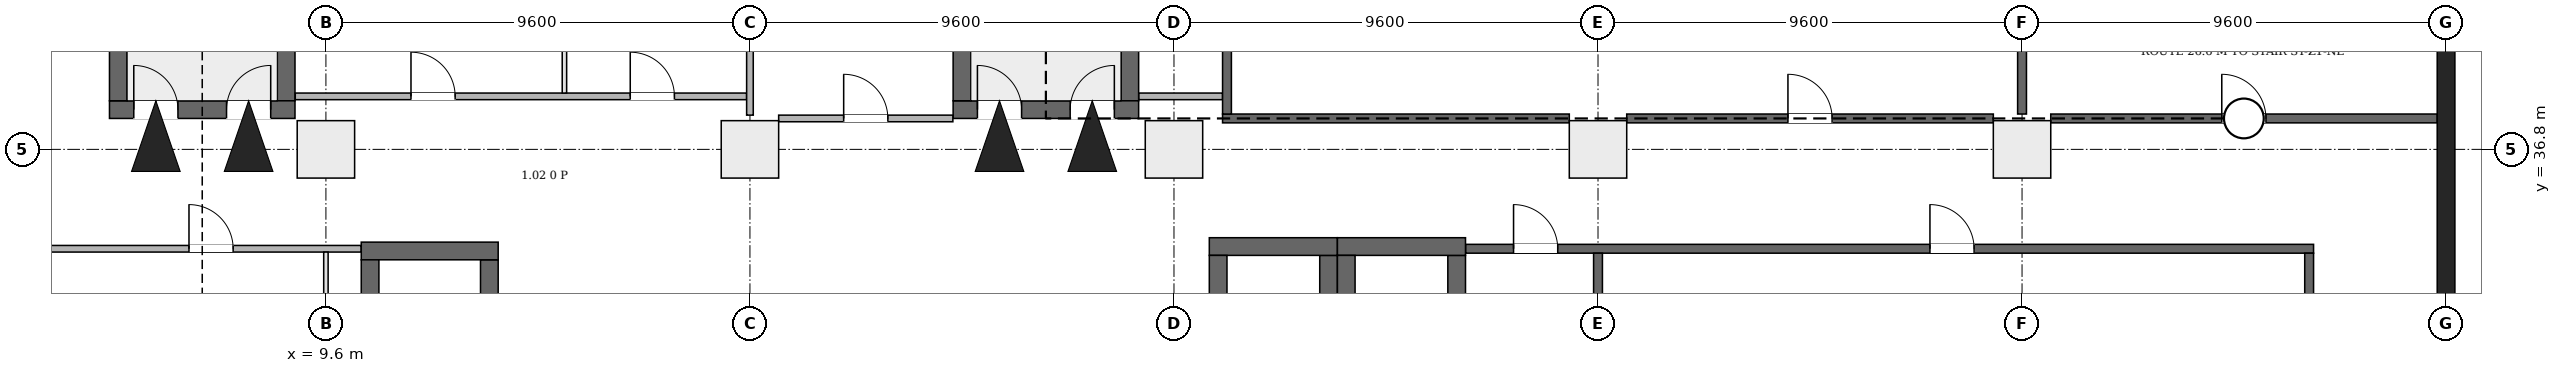
"""IFC4 building model, lengths in metres.
Left out: names, types, materials, properties, quantities, classifications, styles, units other than length and angle.
Written with IfcOpenShell. Run it as: python <this file> out.ifc"""

import sys

from ifc_helpers import new_model, si_unit, direction, frame, frame_2d, origin, origin_2d, place, context, subcontext, project, spatial, rectangle, extrude, element, fill, save


model = new_model("IFC4")
c1 = context("Model", 3, precision=1e-05, world=origin(), true_north=direction((0.0, 1.0)))
c2 = subcontext(c1, "Body", "Model", "MODEL_VIEW")
j1 = project(units=[si_unit("LENGTHUNIT", "METRE"), si_unit("PLANEANGLEUNIT", "RADIAN")], contexts=[c1])
p1 = place(None, origin())
s1 = spatial("IfcSite", under=j1, at=p1, CompositionType="ELEMENT")
p2 = place(p1, origin())
s2 = spatial("IfcBuilding", under=s1, at=p2, CompositionType="ELEMENT")
p3 = place(p2, frame((0.0, 0.0, 6.5)))
s3 = spatial("IfcBuildingStorey", under=s2, at=p3, CompositionType="ELEMENT", Elevation=6.5)
p4 = place(p3, frame((57.6, -0.2, 0.0), z_axis=(0.0, 0.0, 1.0), x_axis=(0.0, 1.0, 0.0)))
e1 = element("IfcWall", 1, at=p4, inside=s3, PredefinedType="SHEAR", context=c2, shape_type="SweptSolid", body=[
    extrude(rectangle(XDim=46.88, YDim=0.4, at=frame_2d((23.44, 0.0))), origin(), (0.0, 0.0, 1.0), 7.7),
])
p5 = place(p3, frame((4.7, 37.7, 0.0), z_axis=(0.0, 0.0, 1.0), x_axis=(1.0, 0.0, 0.0)))
e2 = element("IfcWall", 2, at=p5, inside=s3, PredefinedType="SHEAR", context=c2, shape_type="SweptSolid", body=[
    extrude(rectangle(XDim=4.2, YDim=0.4, at=frame_2d((2.1, 0.0))), origin(), (0.0, 0.0, 1.0), 7.7),
])
p6 = place(p5, frame((0.55, 0.0, 0.0)))
e3 = element("IfcOpeningElement", 3, at=p6, cuts=e2, PredefinedType="OPENING", context=c2, shape_type="SweptSolid", body=[
    extrude(rectangle(XDim=1.0, YDim=2.1, at=frame_2d((0.5, 1.05))), frame((0.0, 0.21, 0.0), z_axis=(0.0, -1.0, 0.0), x_axis=(1.0, 0.0, 0.0)), (0.0, 0.0, 1.0), 0.42),
])
p7 = place(p5, frame((2.65, 0.0, 0.0)))
e4 = element("IfcOpeningElement", 4, at=p7, cuts=e2, PredefinedType="OPENING", context=c2, shape_type="SweptSolid", body=[
    extrude(rectangle(XDim=1.0, YDim=2.1, at=frame_2d((0.5, 1.05))), frame((0.0, 0.21, 0.0), z_axis=(0.0, -1.0, 0.0), x_axis=(1.0, 0.0, 0.0)), (0.0, 0.0, 1.0), 0.42),
])
for number, where, z_axis, x_axis in (
    (5, (4.9, 37.9, 0.0), (0.0, 0.0, 1.0), (0.0, 1.0, 0.0)),
    (6, (8.7, 37.9, 0.0), (0.0, 0.0, 1.0), (0.0, 1.0, 0.0)),
):
    element("IfcWall", number, at=place(p3, frame(where, z_axis=z_axis, x_axis=x_axis)), inside=s3, PredefinedType="SHEAR", context=c2, shape_type="SweptSolid", body=[
        extrude(rectangle(XDim=6.6, YDim=0.4, at=frame_2d((3.3, 0.0))), origin(), (0.0, 0.0, 1.0), 7.7),
    ])
p8 = place(p3, frame((23.8, 37.7, 0.0), z_axis=(0.0, 0.0, 1.0), x_axis=(1.0, 0.0, 0.0)))
e7 = element("IfcWall", 7, at=p8, inside=s3, PredefinedType="SHEAR", context=c2, shape_type="SweptSolid", body=[
    extrude(rectangle(XDim=4.2, YDim=0.4, at=frame_2d((2.1, 0.0))), origin(), (0.0, 0.0, 1.0), 7.7),
])
p9 = place(p8, frame((0.55, 0.0, 0.0)))
e8 = element("IfcOpeningElement", 8, at=p9, cuts=e7, PredefinedType="OPENING", context=c2, shape_type="SweptSolid", body=[
    extrude(rectangle(XDim=1.0, YDim=2.1, at=frame_2d((0.5, 1.05))), frame((0.0, 0.21, 0.0), z_axis=(0.0, -1.0, 0.0), x_axis=(1.0, 0.0, 0.0)), (0.0, 0.0, 1.0), 0.42),
])
p10 = place(p8, frame((2.65, 0.0, 0.0)))
e9 = element("IfcOpeningElement", 9, at=p10, cuts=e7, PredefinedType="OPENING", context=c2, shape_type="SweptSolid", body=[
    extrude(rectangle(XDim=1.0, YDim=2.1, at=frame_2d((0.5, 1.05))), frame((0.0, 0.21, 0.0), z_axis=(0.0, -1.0, 0.0), x_axis=(1.0, 0.0, 0.0)), (0.0, 0.0, 1.0), 0.42),
])
for number, where, z_axis, x_axis in (
    (10, (24.0, 37.9, 0.0), (0.0, 0.0, 1.0), (0.0, 1.0, 0.0)),
    (11, (27.8, 37.9, 0.0), (0.0, 0.0, 1.0), (0.0, 1.0, 0.0)),
):
    element("IfcWall", number, at=place(p3, frame(where, z_axis=z_axis, x_axis=x_axis)), inside=s3, PredefinedType="SHEAR", context=c2, shape_type="SweptSolid", body=[
        extrude(rectangle(XDim=6.6, YDim=0.4, at=frame_2d((3.3, 0.0))), origin(), (0.0, 0.0, 1.0), 7.7),
    ])
p11 = place(p3, frame((10.4, 34.5, 0.0), z_axis=(0.0, 0.0, 1.0), x_axis=(1.0, 0.0, 0.0)))
e12 = element("IfcWall", 12, at=p11, inside=s3, PredefinedType="SHEAR", context=c2, shape_type="SweptSolid", body=[
    extrude(rectangle(XDim=3.1, YDim=0.4, at=frame_2d((1.55, 0.0))), origin(), (0.0, 0.0, 1.0), 7.7),
])
for number, where, z_axis, x_axis in (
    (13, (10.6, 30.9, 0.0), (0.0, 0.0, 1.0), (0.0, 1.0, 0.0)),
    (14, (13.3, 30.9, 0.0), (0.0, 0.0, 1.0), (0.0, 1.0, 0.0)),
):
    element("IfcWall", number, at=place(p3, frame(where, z_axis=z_axis, x_axis=x_axis)), inside=s3, PredefinedType="SHEAR", context=c2, shape_type="SweptSolid", body=[
        extrude(rectangle(XDim=3.4, YDim=0.4, at=frame_2d((1.7, 0.0))), origin(), (0.0, 0.0, 1.0), 7.7),
    ])
p12 = place(p3, frame((29.6, 34.6, 0.0), z_axis=(0.0, 0.0, 1.0), x_axis=(1.0, 0.0, 0.0)))
e15 = element("IfcWall", 15, at=p12, inside=s3, PredefinedType="SHEAR", context=c2, shape_type="SweptSolid", body=[
    extrude(rectangle(XDim=2.9, YDim=0.4, at=frame_2d((1.45, 0.0))), origin(), (0.0, 0.0, 1.0), 7.7),
])
for number, where, z_axis, x_axis in (
    (16, (29.8, 31.4, 0.0), (0.0, 0.0, 1.0), (0.0, 1.0, 0.0)),
    (17, (32.3, 31.4, 0.0), (0.0, 0.0, 1.0), (0.0, 1.0, 0.0)),
):
    element("IfcWall", number, at=place(p3, frame(where, z_axis=z_axis, x_axis=x_axis)), inside=s3, PredefinedType="SHEAR", context=c2, shape_type="SweptSolid", body=[
        extrude(rectangle(XDim=3.0, YDim=0.4, at=frame_2d((1.5, 0.0))), origin(), (0.0, 0.0, 1.0), 7.7),
    ])
p13 = place(p3, frame((32.5, 34.6, 0.0), z_axis=(0.0, 0.0, 1.0), x_axis=(1.0, 0.0, 0.0)))
e18 = element("IfcWall", 18, at=p13, inside=s3, PredefinedType="SHEAR", context=c2, shape_type="SweptSolid", body=[
    extrude(rectangle(XDim=2.9, YDim=0.4, at=frame_2d((1.45, 0.0))), origin(), (0.0, 0.0, 1.0), 7.7),
])
for number, where, z_axis, x_axis in (
    (19, (32.7, 31.4, 0.0), (0.0, 0.0, 1.0), (0.0, 1.0, 0.0)),
    (20, (35.2, 31.4, 0.0), (0.0, 0.0, 1.0), (0.0, 1.0, 0.0)),
):
    element("IfcWall", number, at=place(p3, frame(where, z_axis=z_axis, x_axis=x_axis)), inside=s3, PredefinedType="SHEAR", context=c2, shape_type="SweptSolid", body=[
        extrude(rectangle(XDim=3.0, YDim=0.4, at=frame_2d((1.5, 0.0))), origin(), (0.0, 0.0, 1.0), 7.7),
    ])
for number, where, z_axis, x_axis in (
    (21, (9.6, 36.8, 0.0), (0.0, 0.0, 1.0), (1.0, 0.0, 0.0)),
    (22, (19.2, 36.8, 0.0), (0.0, 0.0, 1.0), (1.0, 0.0, 0.0)),
    (23, (28.8, 36.8, 0.0), (0.0, 0.0, 1.0), (1.0, 0.0, 0.0)),
    (24, (38.4, 36.8, 0.0), (0.0, 0.0, 1.0), (1.0, 0.0, 0.0)),
    (25, (48.0, 36.8, 0.0), (0.0, 0.0, 1.0), (1.0, 0.0, 0.0)),
):
    element("IfcColumn", number, at=place(p3, frame(where, z_axis=z_axis, x_axis=x_axis)), inside=s3, PredefinedType="COLUMN", context=c2, shape_type="SweptSolid", body=[
        extrude(rectangle(XDim=1.3, YDim=1.3, at=origin_2d()), origin(), (0.0, 0.0, 1.0), 7.7),
    ])
p14 = place(p3, frame((2.706, 34.55, 0.0), z_axis=(0.0, 0.0, 1.0), x_axis=(1.0, 0.0, 0.0)))
e26 = element("IfcWall", 26, at=p14, inside=s3, PredefinedType="PARTITIONING", context=c2, shape_type="SweptSolid", body=[
    extrude(rectangle(XDim=7.688, YDim=0.15, at=frame_2d((3.844, 0.0))), origin(), (0.0, 0.0, 1.0), 7.35),
])
p15 = place(p14, frame((3.794, 0.0, 0.0)))
e27 = element("IfcOpeningElement", 27, at=p15, cuts=e26, PredefinedType="OPENING", context=c2, shape_type="SweptSolid", body=[
    extrude(rectangle(XDim=1.0, YDim=2.1, at=frame_2d((0.5, 1.05))), frame((0.0, 0.085, 0.0), z_axis=(0.0, -1.0, 0.0), x_axis=(1.0, 0.0, 0.0)), (0.0, 0.0, 1.0), 0.17),
])
p16 = place(p3, frame((8.906, 38.0, 0.0), z_axis=(0.0, 0.0, 1.0), x_axis=(1.0, 0.0, 0.0)))
e28 = element("IfcWall", 28, at=p16, inside=s3, PredefinedType="PARTITIONING", context=c2, shape_type="SweptSolid", body=[
    extrude(rectangle(XDim=10.219, YDim=0.15, at=frame_2d((5.109, 0.0))), origin(), (0.0, 0.0, 1.0), 7.35),
])
p17 = place(p16, frame((2.62, 0.0, 0.0)))
e29 = element("IfcOpeningElement", 29, at=p17, cuts=e28, PredefinedType="OPENING", context=c2, shape_type="SweptSolid", body=[
    extrude(rectangle(XDim=1.0, YDim=2.1, at=frame_2d((0.5, 1.05))), frame((0.0, 0.085, 0.0), z_axis=(0.0, -1.0, 0.0), x_axis=(1.0, 0.0, 0.0)), (0.0, 0.0, 1.0), 0.17),
])
p18 = place(p16, frame((7.584, 0.0, 0.0)))
e30 = element("IfcOpeningElement", 30, at=p18, cuts=e28, PredefinedType="OPENING", context=c2, shape_type="SweptSolid", body=[
    extrude(rectangle(XDim=1.0, YDim=2.1, at=frame_2d((0.5, 1.05))), frame((0.0, 0.085, 0.0), z_axis=(0.0, -1.0, 0.0), x_axis=(1.0, 0.0, 0.0)), (0.0, 0.0, 1.0), 0.17),
])
p19 = place(p3, frame((9.6, 31.075, 0.0), z_axis=(0.0, 0.0, 1.0), x_axis=(0.0, 1.0, 0.0)))
e31 = element("IfcWall", 31, at=p19, inside=s3, PredefinedType="PARTITIONING", context=c2, shape_type="SweptSolid", body=[
    extrude(rectangle(XDim=3.4, YDim=0.1, at=frame_2d((1.7, 0.0))), origin(), (0.0, 0.0, 1.0), 6.95),
])
p20 = place(p3, frame((15.0, 38.075, 0.0), z_axis=(0.0, 0.0, 1.0), x_axis=(0.0, 1.0, 0.0)))
e32 = element("IfcWall", 32, at=p20, inside=s3, PredefinedType="PARTITIONING", context=c2, shape_type="SweptSolid", body=[
    extrude(rectangle(XDim=5.6, YDim=0.1, at=frame_2d((2.8, 0.0))), origin(), (0.0, 0.0, 1.0), 7.35),
])
p21 = place(p3, frame((19.2, 37.575, 0.0), z_axis=(0.0, 0.0, 1.0), x_axis=(0.0, 1.0, 0.0)))
e33 = element("IfcWall", 33, at=p21, inside=s3, PredefinedType="PARTITIONING", context=c2, shape_type="SweptSolid", body=[
    extrude(rectangle(XDim=6.1, YDim=0.15, at=frame_2d((3.05, 0.0))), origin(), (0.0, 0.0, 1.0), 6.95),
])
p22 = place(p3, frame((19.85, 37.5, 0.0), z_axis=(0.0, 0.0, 1.0), x_axis=(1.0, 0.0, 0.0)))
e34 = element("IfcWall", 34, at=p22, inside=s3, PredefinedType="PARTITIONING", context=c2, shape_type="SweptSolid", body=[
    extrude(rectangle(XDim=3.944, YDim=0.15, at=frame_2d((1.972, 0.0))), origin(), (0.0, 0.0, 1.0), 7.35),
])
p23 = place(p22, frame((1.472, 0.0, 0.0)))
e35 = element("IfcOpeningElement", 35, at=p23, cuts=e34, PredefinedType="OPENING", context=c2, shape_type="SweptSolid", body=[
    extrude(rectangle(XDim=1.0, YDim=2.1, at=frame_2d((0.5, 1.05))), frame((0.0, 0.085, 0.0), z_axis=(0.0, -1.0, 0.0), x_axis=(1.0, 0.0, 0.0)), (0.0, 0.0, 1.0), 0.17),
])
p24 = place(p3, frame((28.006, 38.0, 0.0), z_axis=(0.0, 0.0, 1.0), x_axis=(1.0, 0.0, 0.0)))
e36 = element("IfcWall", 36, at=p24, inside=s3, PredefinedType="PARTITIONING", context=c2, shape_type="SweptSolid", body=[
    extrude(rectangle(XDim=1.894, YDim=0.15, at=frame_2d((0.947, 0.0))), origin(), (0.0, 0.0, 1.0), 7.35),
])
p25 = place(p3, frame((29.9, 37.5, 0.0), z_axis=(0.0, 0.0, 1.0), x_axis=(1.0, 0.0, 0.0)))
e37 = element("IfcWall", 37, at=p25, inside=s3, PredefinedType="PARTITIONING", context=c2, shape_type="SweptSolid", body=[
    extrude(rectangle(XDim=7.85, YDim=0.2, at=frame_2d((3.925, 0.0))), origin(), (0.0, 0.0, 1.0), 7.35),
])
p26 = place(p3, frame((30.0, 37.6, 0.0), z_axis=(0.0, 0.0, 1.0), x_axis=(0.0, 1.0, 0.0)))
e38 = element("IfcWall", 38, at=p26, inside=s3, PredefinedType="PARTITIONING", context=c2, shape_type="SweptSolid", body=[
    extrude(rectangle(XDim=6.05, YDim=0.2, at=frame_2d((3.025, 0.0))), origin(), (0.0, 0.0, 1.0), 7.35),
])
p27 = place(p3, frame((35.406, 34.55, 0.0), z_axis=(0.0, 0.0, 1.0), x_axis=(1.0, 0.0, 0.0)))
e39 = element("IfcWall", 39, at=p27, inside=s3, PredefinedType="PARTITIONING", context=c2, shape_type="SweptSolid", body=[
    extrude(rectangle(XDim=19.194, YDim=0.2, at=frame_2d((9.597, 0.0))), origin(), (0.0, 0.0, 1.0), 7.35),
])
p28 = place(p27, frame((1.082, 0.0, 0.0)))
e40 = element("IfcOpeningElement", 40, at=p28, cuts=e39, PredefinedType="OPENING", context=c2, shape_type="SweptSolid", body=[
    extrude(rectangle(XDim=1.0, YDim=2.1, at=frame_2d((0.5, 1.05))), frame((0.0, 0.11, 0.0), z_axis=(0.0, -1.0, 0.0), x_axis=(1.0, 0.0, 0.0)), (0.0, 0.0, 1.0), 0.22),
])
p29 = place(p27, frame((10.509, 0.0, 0.0)))
e41 = element("IfcOpeningElement", 41, at=p29, cuts=e39, PredefinedType="OPENING", context=c2, shape_type="SweptSolid", body=[
    extrude(rectangle(XDim=1.0, YDim=2.1, at=frame_2d((0.5, 1.05))), frame((0.0, 0.11, 0.0), z_axis=(0.0, -1.0, 0.0), x_axis=(1.0, 0.0, 0.0)), (0.0, 0.0, 1.0), 0.22),
])
p30 = place(p3, frame((38.4, 28.25, 0.0), z_axis=(0.0, 0.0, 1.0), x_axis=(0.0, 1.0, 0.0)))
e42 = element("IfcWall", 42, at=p30, inside=s3, PredefinedType="PARTITIONING", context=c2, shape_type="SweptSolid", body=[
    extrude(rectangle(XDim=6.2, YDim=0.2, at=frame_2d((3.1, 0.0))), origin(), (0.0, 0.0, 1.0), 6.95),
])
p31 = place(p3, frame((39.05, 37.5, 0.0), z_axis=(0.0, 0.0, 1.0), x_axis=(1.0, 0.0, 0.0)))
e43 = element("IfcWall", 43, at=p31, inside=s3, PredefinedType="PARTITIONING", context=c2, shape_type="SweptSolid", body=[
    extrude(rectangle(XDim=8.3, YDim=0.2, at=frame_2d((4.15, 0.0))), origin(), (0.0, 0.0, 1.0), 7.35),
])
p32 = place(p31, frame((3.65, 0.0, 0.0)))
e44 = element("IfcOpeningElement", 44, at=p32, cuts=e43, PredefinedType="OPENING", context=c2, shape_type="SweptSolid", body=[
    extrude(rectangle(XDim=1.0, YDim=2.1, at=frame_2d((0.5, 1.05))), frame((0.0, 0.11, 0.0), z_axis=(0.0, -1.0, 0.0), x_axis=(1.0, 0.0, 0.0)), (0.0, 0.0, 1.0), 0.22),
])
p33 = place(p3, frame((48.0, 37.6, 0.0), z_axis=(0.0, 0.0, 1.0), x_axis=(0.0, 1.0, 0.0)))
e45 = element("IfcWall", 45, at=p33, inside=s3, PredefinedType="PARTITIONING", context=c2, shape_type="SweptSolid", body=[
    extrude(rectangle(XDim=6.05, YDim=0.2, at=frame_2d((3.025, 0.0))), origin(), (0.0, 0.0, 1.0), 6.95),
])
p34 = place(p3, frame((48.65, 37.5, 0.0), z_axis=(0.0, 0.0, 1.0), x_axis=(1.0, 0.0, 0.0)))
e46 = element("IfcWall", 46, at=p34, inside=s3, PredefinedType="PARTITIONING", context=c2, shape_type="SweptSolid", body=[
    extrude(rectangle(XDim=8.744, YDim=0.2, at=frame_2d((4.372, 0.0))), origin(), (0.0, 0.0, 1.0), 7.35),
])
p35 = place(p34, frame((3.872, 0.0, 0.0)))
e47 = element("IfcOpeningElement", 47, at=p35, cuts=e46, PredefinedType="OPENING", context=c2, shape_type="SweptSolid", body=[
    extrude(rectangle(XDim=1.0, YDim=2.1, at=frame_2d((0.5, 1.05))), frame((0.0, 0.11, 0.0), z_axis=(0.0, -1.0, 0.0), x_axis=(1.0, 0.0, 0.0)), (0.0, 0.0, 1.0), 0.22),
])
p36 = place(p3, frame((54.5, 19.1, 0.0), z_axis=(0.0, 0.0, 1.0), x_axis=(0.0, 1.0, 0.0)))
e48 = element("IfcWall", 48, at=p36, inside=s3, PredefinedType="PARTITIONING", context=c2, shape_type="SweptSolid", body=[
    extrude(rectangle(XDim=15.35, YDim=0.2, at=frame_2d((7.675, 0.0))), origin(), (0.0, 0.0, 1.0), 7.35),
])
p37 = place(p6, origin())
e49 = element("IfcDoor", 49, at=p37, inside=s3, OperationType="SINGLE_SWING_RIGHT", PredefinedType="DOOR", context=c2, shape_type="SweptSolid", body=[
    extrude(rectangle(XDim=1.0, YDim=2.1, at=frame_2d((0.5, 1.05))), frame((0.0, 0.025, 0.0), z_axis=(0.0, -1.0, 0.0), x_axis=(1.0, 0.0, 0.0)), (0.0, 0.0, 1.0), 0.05),
])
fill(e3, e49)
p38 = place(p7, origin())
e50 = element("IfcDoor", 50, at=p38, inside=s3, OperationType="SINGLE_SWING_LEFT", PredefinedType="DOOR", context=c2, shape_type="SweptSolid", body=[
    extrude(rectangle(XDim=1.0, YDim=2.1, at=frame_2d((0.5, 1.05))), frame((0.0, 0.025, 0.0), z_axis=(0.0, -1.0, 0.0), x_axis=(1.0, 0.0, 0.0)), (0.0, 0.0, 1.0), 0.05),
])
fill(e4, e50)
p39 = place(p9, origin())
e51 = element("IfcDoor", 51, at=p39, inside=s3, OperationType="SINGLE_SWING_RIGHT", PredefinedType="DOOR", context=c2, shape_type="SweptSolid", body=[
    extrude(rectangle(XDim=1.0, YDim=2.1, at=frame_2d((0.5, 1.05))), frame((0.0, 0.025, 0.0), z_axis=(0.0, -1.0, 0.0), x_axis=(1.0, 0.0, 0.0)), (0.0, 0.0, 1.0), 0.05),
])
fill(e8, e51)
p40 = place(p10, origin())
e52 = element("IfcDoor", 52, at=p40, inside=s3, OperationType="SINGLE_SWING_LEFT", PredefinedType="DOOR", context=c2, shape_type="SweptSolid", body=[
    extrude(rectangle(XDim=1.0, YDim=2.1, at=frame_2d((0.5, 1.05))), frame((0.0, 0.025, 0.0), z_axis=(0.0, -1.0, 0.0), x_axis=(1.0, 0.0, 0.0)), (0.0, 0.0, 1.0), 0.05),
])
fill(e9, e52)
p41 = place(p15, origin())
e53 = element("IfcDoor", 53, at=p41, inside=s3, OperationType="SINGLE_SWING_LEFT", PredefinedType="DOOR", context=c2, shape_type="SweptSolid", body=[
    extrude(rectangle(XDim=1.0, YDim=2.1, at=frame_2d((0.5, 1.05))), frame((0.0, 0.025, 0.0), z_axis=(0.0, -1.0, 0.0), x_axis=(1.0, 0.0, 0.0)), (0.0, 0.0, 1.0), 0.05),
])
fill(e27, e53)
p42 = place(p28, origin())
e54 = element("IfcDoor", 54, at=p42, inside=s3, OperationType="SINGLE_SWING_RIGHT", PredefinedType="DOOR", context=c2, shape_type="SweptSolid", body=[
    extrude(rectangle(XDim=1.0, YDim=2.1, at=frame_2d((0.5, 1.05))), frame((0.0, 0.025, 0.0), z_axis=(0.0, -1.0, 0.0), x_axis=(1.0, 0.0, 0.0)), (0.0, 0.0, 1.0), 0.05),
])
fill(e40, e54)
p43 = place(p29, origin())
e55 = element("IfcDoor", 55, at=p43, inside=s3, OperationType="SINGLE_SWING_RIGHT", PredefinedType="DOOR", context=c2, shape_type="SweptSolid", body=[
    extrude(rectangle(XDim=1.0, YDim=2.1, at=frame_2d((0.5, 1.05))), frame((0.0, 0.025, 0.0), z_axis=(0.0, -1.0, 0.0), x_axis=(1.0, 0.0, 0.0)), (0.0, 0.0, 1.0), 0.05),
])
fill(e41, e55)
p44 = place(p32, origin())
e56 = element("IfcDoor", 56, at=p44, inside=s3, OperationType="SINGLE_SWING_LEFT", PredefinedType="DOOR", context=c2, shape_type="SweptSolid", body=[
    extrude(rectangle(XDim=1.0, YDim=2.1, at=frame_2d((0.5, 1.05))), frame((0.0, 0.025, 0.0), z_axis=(0.0, -1.0, 0.0), x_axis=(1.0, 0.0, 0.0)), (0.0, 0.0, 1.0), 0.05),
])
fill(e44, e56)
p45 = place(p35, origin())
e57 = element("IfcDoor", 57, at=p45, inside=s3, OperationType="SINGLE_SWING_LEFT", PredefinedType="DOOR", context=c2, shape_type="SweptSolid", body=[
    extrude(rectangle(XDim=1.0, YDim=2.1, at=frame_2d((0.5, 1.05))), frame((0.0, 0.025, 0.0), z_axis=(0.0, -1.0, 0.0), x_axis=(1.0, 0.0, 0.0)), (0.0, 0.0, 1.0), 0.05),
])
fill(e47, e57)
p46 = place(p17, origin())
e58 = element("IfcDoor", 58, at=p46, inside=s3, OperationType="SINGLE_SWING_LEFT", PredefinedType="DOOR", context=c2, shape_type="SweptSolid", body=[
    extrude(rectangle(XDim=1.0, YDim=2.1, at=frame_2d((0.5, 1.05))), frame((0.0, 0.025, 0.0), z_axis=(0.0, -1.0, 0.0), x_axis=(1.0, 0.0, 0.0)), (0.0, 0.0, 1.0), 0.05),
])
fill(e29, e58)
p47 = place(p18, origin())
e59 = element("IfcDoor", 59, at=p47, inside=s3, OperationType="SINGLE_SWING_RIGHT", PredefinedType="DOOR", context=c2, shape_type="SweptSolid", body=[
    extrude(rectangle(XDim=1.0, YDim=2.1, at=frame_2d((0.5, 1.05))), frame((0.0, 0.025, 0.0), z_axis=(0.0, -1.0, 0.0), x_axis=(1.0, 0.0, 0.0)), (0.0, 0.0, 1.0), 0.05),
])
fill(e30, e59)
p48 = place(p23, origin())
e60 = element("IfcDoor", 60, at=p48, inside=s3, OperationType="SINGLE_SWING_LEFT", PredefinedType="DOOR", context=c2, shape_type="SweptSolid", body=[
    extrude(rectangle(XDim=1.0, YDim=2.1, at=frame_2d((0.5, 1.05))), frame((0.0, 0.025, 0.0), z_axis=(0.0, -1.0, 0.0), x_axis=(1.0, 0.0, 0.0)), (0.0, 0.0, 1.0), 0.05),
])
fill(e35, e60)
save(model, sys.argv[1])
